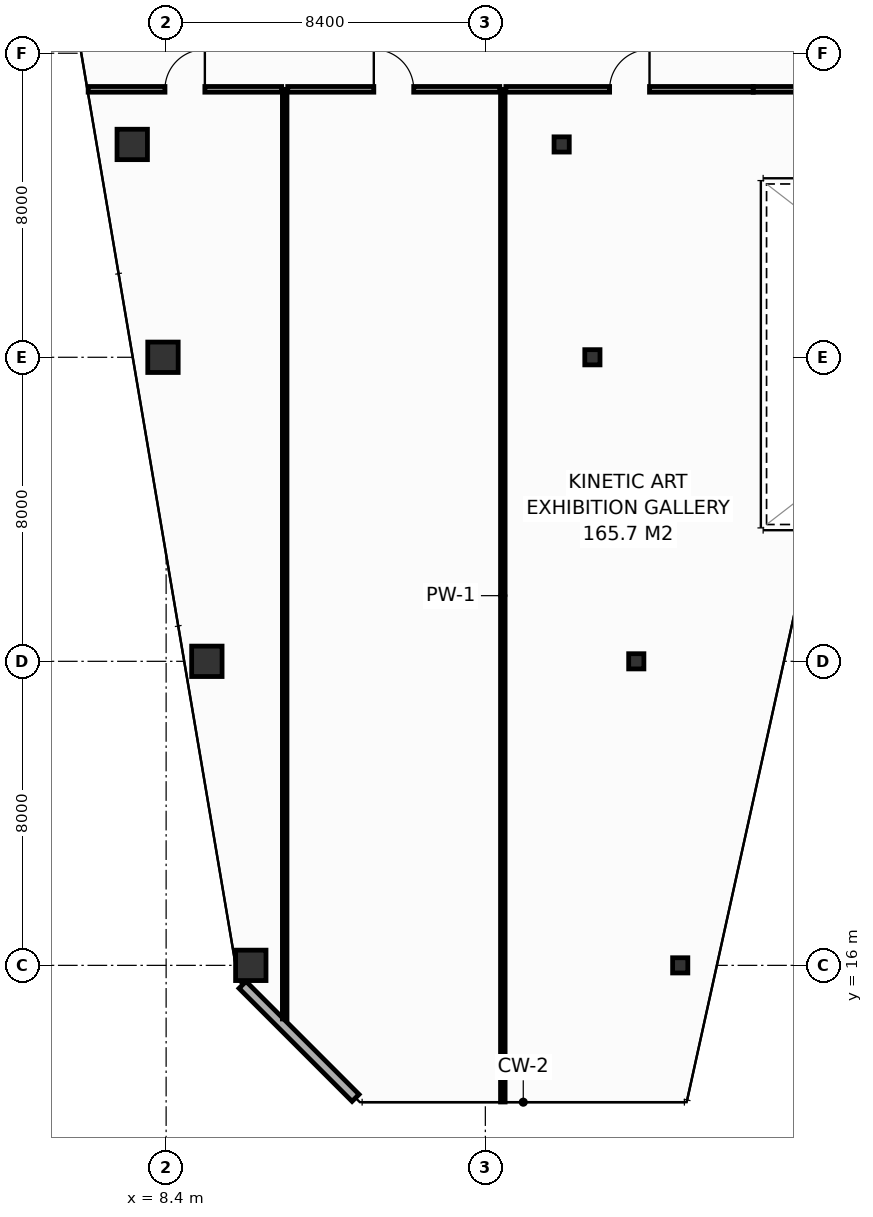
"""IFC4 building model, lengths in metres.
Left out: names, types, materials, properties, quantities, classifications, styles, units other than length and angle.
Written with IfcOpenShell. Run it as: python <this file> out.ifc"""

import sys

from ifc_helpers import new_model, si_unit, direction, frame, frame_2d, origin, origin_2d, place, context, subcontext, project, spatial, rectangle, hollow_rectangle, extrude, element, fill, save


model = new_model("IFC4")
c1 = context("Model", 3, precision=1e-05, world=origin(), true_north=direction((0.0, 1.0)))
c2 = subcontext(c1, "Body", "Model", "MODEL_VIEW")
j1 = project(units=[si_unit("LENGTHUNIT", "METRE"), si_unit("PLANEANGLEUNIT", "RADIAN")], contexts=[c1])
p1 = place(None, origin())
s1 = spatial("IfcSite", under=j1, at=p1, CompositionType="ELEMENT")
p2 = place(p1, origin())
s2 = spatial("IfcBuilding", under=s1, at=p2, CompositionType="ELEMENT")
p3 = place(p2, frame((0.0, 0.0, 201.8)))
s3 = spatial("IfcBuildingStorey", under=s2, at=p3, CompositionType="ELEMENT", Elevation=201.8)
p4 = place(p3, frame((10.628, 16.0, 0.0), z_axis=(0.0, 0.0, 1.0), x_axis=(1.0, 0.0, 0.0)))
e1 = element("IfcColumn", 1, at=p4, inside=s3, PredefinedType="COLUMN", context=c2, shape_type="SweptSolid", body=[
    extrude(hollow_rectangle(XDim=0.8, YDim=0.8, WallThickness=0.036, at=origin_2d()), origin(), (0.0, 0.0, 1.0), 3.8),
])
p5 = place(p3, frame((21.928, 16.0, 0.0), z_axis=(0.0, 0.0, 1.0), x_axis=(1.0, 0.0, 0.0)))
e2 = element("IfcColumn", 2, at=p5, inside=s3, PredefinedType="COLUMN", context=c2, shape_type="SweptSolid", body=[
    extrude(hollow_rectangle(XDim=0.4, YDim=0.4, WallThickness=0.016, at=origin_2d()), origin(), (0.0, 0.0, 1.0), 3.8),
])
p6 = place(p3, frame((9.472, 24.0, 0.0), z_axis=(0.0, 0.0, 1.0), x_axis=(1.0, 0.0, 0.0)))
e3 = element("IfcColumn", 3, at=p6, inside=s3, PredefinedType="COLUMN", context=c2, shape_type="SweptSolid", body=[
    extrude(hollow_rectangle(XDim=0.8, YDim=0.8, WallThickness=0.036, at=origin_2d()), origin(), (0.0, 0.0, 1.0), 3.8),
])
p7 = place(p3, frame((20.772, 24.0, 0.0), z_axis=(0.0, 0.0, 1.0), x_axis=(1.0, 0.0, 0.0)))
e4 = element("IfcColumn", 4, at=p7, inside=s3, PredefinedType="COLUMN", context=c2, shape_type="SweptSolid", body=[
    extrude(hollow_rectangle(XDim=0.4, YDim=0.4, WallThickness=0.016, at=origin_2d()), origin(), (0.0, 0.0, 1.0), 3.8),
])
p8 = place(p3, frame((8.317, 32.0, 0.0), z_axis=(0.0, 0.0, 1.0), x_axis=(1.0, 0.0, 0.0)))
e5 = element("IfcColumn", 5, at=p8, inside=s3, PredefinedType="COLUMN", context=c2, shape_type="SweptSolid", body=[
    extrude(hollow_rectangle(XDim=0.8, YDim=0.8, WallThickness=0.036, at=origin_2d()), origin(), (0.0, 0.0, 1.0), 3.8),
])
p9 = place(p3, frame((19.617, 32.0, 0.0), z_axis=(0.0, 0.0, 1.0), x_axis=(1.0, 0.0, 0.0)))
e6 = element("IfcColumn", 6, at=p9, inside=s3, PredefinedType="COLUMN", context=c2, shape_type="SweptSolid", body=[
    extrude(hollow_rectangle(XDim=0.4, YDim=0.4, WallThickness=0.016, at=origin_2d()), origin(), (0.0, 0.0, 1.0), 3.8),
])
p10 = place(p3, frame((7.508, 37.6, 0.0), z_axis=(0.0, 0.0, 1.0), x_axis=(1.0, 0.0, 0.0)))
e7 = element("IfcColumn", 7, at=p10, inside=s3, PredefinedType="COLUMN", context=c2, shape_type="SweptSolid", body=[
    extrude(hollow_rectangle(XDim=0.8, YDim=0.8, WallThickness=0.036, at=origin_2d()), origin(), (0.0, 0.0, 1.0), 3.8),
])
p11 = place(p3, frame((18.808, 37.6, 0.0), z_axis=(0.0, 0.0, 1.0), x_axis=(1.0, 0.0, 0.0)))
e8 = element("IfcColumn", 8, at=p11, inside=s3, PredefinedType="COLUMN", context=c2, shape_type="SweptSolid", body=[
    extrude(hollow_rectangle(XDim=0.4, YDim=0.4, WallThickness=0.016, at=origin_2d()), origin(), (0.0, 0.0, 1.0), 3.8),
])
p12 = place(p3, frame((10.411, 15.487, 0.0), z_axis=(0.0, 0.0, 1.0), x_axis=(0.707135806771, -0.70707775441, 0.0)))
e9 = element("IfcWall", 9, at=p12, inside=s3, PredefinedType="STANDARD", context=c2, shape_type="SweptSolid", body=[
    extrude(rectangle(XDim=4.206, YDim=0.26, at=frame_2d((2.103, 0.0))), origin(), (0.0, 0.0, 1.0), 3.55),
])
p13 = place(p3, frame((11.52, 14.59, 0.0), z_axis=(0.0, 0.0, 1.0), x_axis=(0.0, 1.0, 0.0)))
e10 = element("IfcWall", 10, at=p13, inside=s3, PredefinedType="PARTITIONING", context=c2, shape_type="SweptSolid", body=[
    extrude(rectangle(XDim=24.46, YDim=0.12, at=frame_2d((12.23, 0.0))), origin(), (0.0, 0.0, 1.0), 2.835),
])
p14 = place(p3, frame((17.26, 12.405, 0.0), z_axis=(0.0, 0.0, 1.0), x_axis=(0.0, 1.0, 0.0)))
e11 = element("IfcWall", 11, at=p14, inside=s3, PredefinedType="PARTITIONING", context=c2, shape_type="SweptSolid", body=[
    extrude(rectangle(XDim=26.645, YDim=0.12, at=frame_2d((13.323, 0.0))), origin(), (0.0, 0.0, 1.0), 2.835),
])
p15 = place(p3, frame((6.348, 39.05, 0.0), z_axis=(0.0, 0.0, 1.0), x_axis=(1.0, 0.0, 0.0)))
e12 = element("IfcWall", 12, at=p15, inside=s3, PredefinedType="PARTITIONING", context=c2, shape_type="SweptSolid", body=[
    extrude(rectangle(XDim=5.092, YDim=0.15, at=frame_2d((2.546, 0.0))), origin(), (0.0, 0.0, 1.0), 3.035),
])
p16 = place(p15, frame((2.021, 0.0, 0.0)))
e13 = element("IfcOpeningElement", 13, at=p16, cuts=e12, PredefinedType="OPENING", context=c2, shape_type="SweptSolid", body=[
    extrude(rectangle(XDim=1.05, YDim=2.15, at=frame_2d((0.525, 1.075))), frame((0.0, 0.085, 0.0), z_axis=(0.0, -1.0, 0.0), x_axis=(1.0, 0.0, 0.0)), (0.0, 0.0, 1.0), 0.17),
])
p17 = place(p3, frame((11.6, 39.05, 0.0), z_axis=(0.0, 0.0, 1.0), x_axis=(1.0, 0.0, 0.0)))
e14 = element("IfcWall", 14, at=p17, inside=s3, PredefinedType="PARTITIONING", context=c2, shape_type="SweptSolid", body=[
    extrude(rectangle(XDim=5.58, YDim=0.15, at=frame_2d((2.79, 0.0))), origin(), (0.0, 0.0, 1.0), 3.55),
])
p18 = place(p17, frame((2.265, 0.0, 0.0)))
e15 = element("IfcOpeningElement", 15, at=p18, cuts=e14, PredefinedType="OPENING", context=c2, shape_type="SweptSolid", body=[
    extrude(rectangle(XDim=1.05, YDim=2.15, at=frame_2d((0.525, 1.075))), frame((0.0, 0.085, 0.0), z_axis=(0.0, -1.0, 0.0), x_axis=(1.0, 0.0, 0.0)), (0.0, 0.0, 1.0), 0.17),
])
p19 = place(p3, frame((17.34, 39.05, 0.0), z_axis=(0.0, 0.0, 1.0), x_axis=(1.0, 0.0, 0.0)))
e16 = element("IfcWall", 16, at=p19, inside=s3, PredefinedType="PARTITIONING", context=c2, shape_type="SweptSolid", body=[
    extrude(rectangle(XDim=6.51, YDim=0.15, at=frame_2d((3.255, 0.0))), origin(), (0.0, 0.0, 1.0), 2.835),
])
p20 = place(p19, frame((2.73, 0.0, 0.0)))
e17 = element("IfcOpeningElement", 17, at=p20, cuts=e16, PredefinedType="OPENING", context=c2, shape_type="SweptSolid", body=[
    extrude(rectangle(XDim=1.05, YDim=2.15, at=frame_2d((0.525, 1.075))), frame((0.0, 0.085, 0.0), z_axis=(0.0, -1.0, 0.0), x_axis=(1.0, 0.0, 0.0)), (0.0, 0.0, 1.0), 0.17),
])
p21 = place(p3, frame((23.85, 39.05, 0.0), z_axis=(0.0, 0.0, 1.0), x_axis=(1.0, 0.0, 0.0)))
e18 = element("IfcWall", 18, at=p21, inside=s3, PredefinedType="PARTITIONING", context=c2, shape_type="SweptSolid", body=[
    extrude(rectangle(XDim=12.3, YDim=0.15, at=frame_2d((6.15, 0.0))), origin(), (0.0, 0.0, 1.0), 3.55),
])
p22 = place(p16, origin())
e19 = element("IfcDoor", 19, at=p22, inside=s3, OperationType="SINGLE_SWING_RIGHT", PredefinedType="DOOR", context=c2, shape_type="SweptSolid", body=[
    extrude(rectangle(XDim=1.05, YDim=2.15, at=frame_2d((0.525, 1.075))), frame((0.0, 0.025, 0.0), z_axis=(0.0, -1.0, 0.0), x_axis=(1.0, 0.0, 0.0)), (0.0, 0.0, 1.0), 0.05),
])
fill(e13, e19)
p23 = place(p18, origin())
e20 = element("IfcDoor", 20, at=p23, inside=s3, OperationType="SINGLE_SWING_LEFT", PredefinedType="DOOR", context=c2, shape_type="SweptSolid", body=[
    extrude(rectangle(XDim=1.05, YDim=2.15, at=frame_2d((0.525, 1.075))), frame((0.0, 0.025, 0.0), z_axis=(0.0, -1.0, 0.0), x_axis=(1.0, 0.0, 0.0)), (0.0, 0.0, 1.0), 0.05),
])
fill(e15, e20)
p24 = place(p20, origin())
e21 = element("IfcDoor", 21, at=p24, inside=s3, OperationType="SINGLE_SWING_RIGHT", PredefinedType="DOOR", context=c2, shape_type="SweptSolid", body=[
    extrude(rectangle(XDim=1.05, YDim=2.15, at=frame_2d((0.525, 1.075))), frame((0.0, 0.025, 0.0), z_axis=(0.0, -1.0, 0.0), x_axis=(1.0, 0.0, 0.0)), (0.0, 0.0, 1.0), 0.05),
])
fill(e17, e21)
save(model, sys.argv[1])
